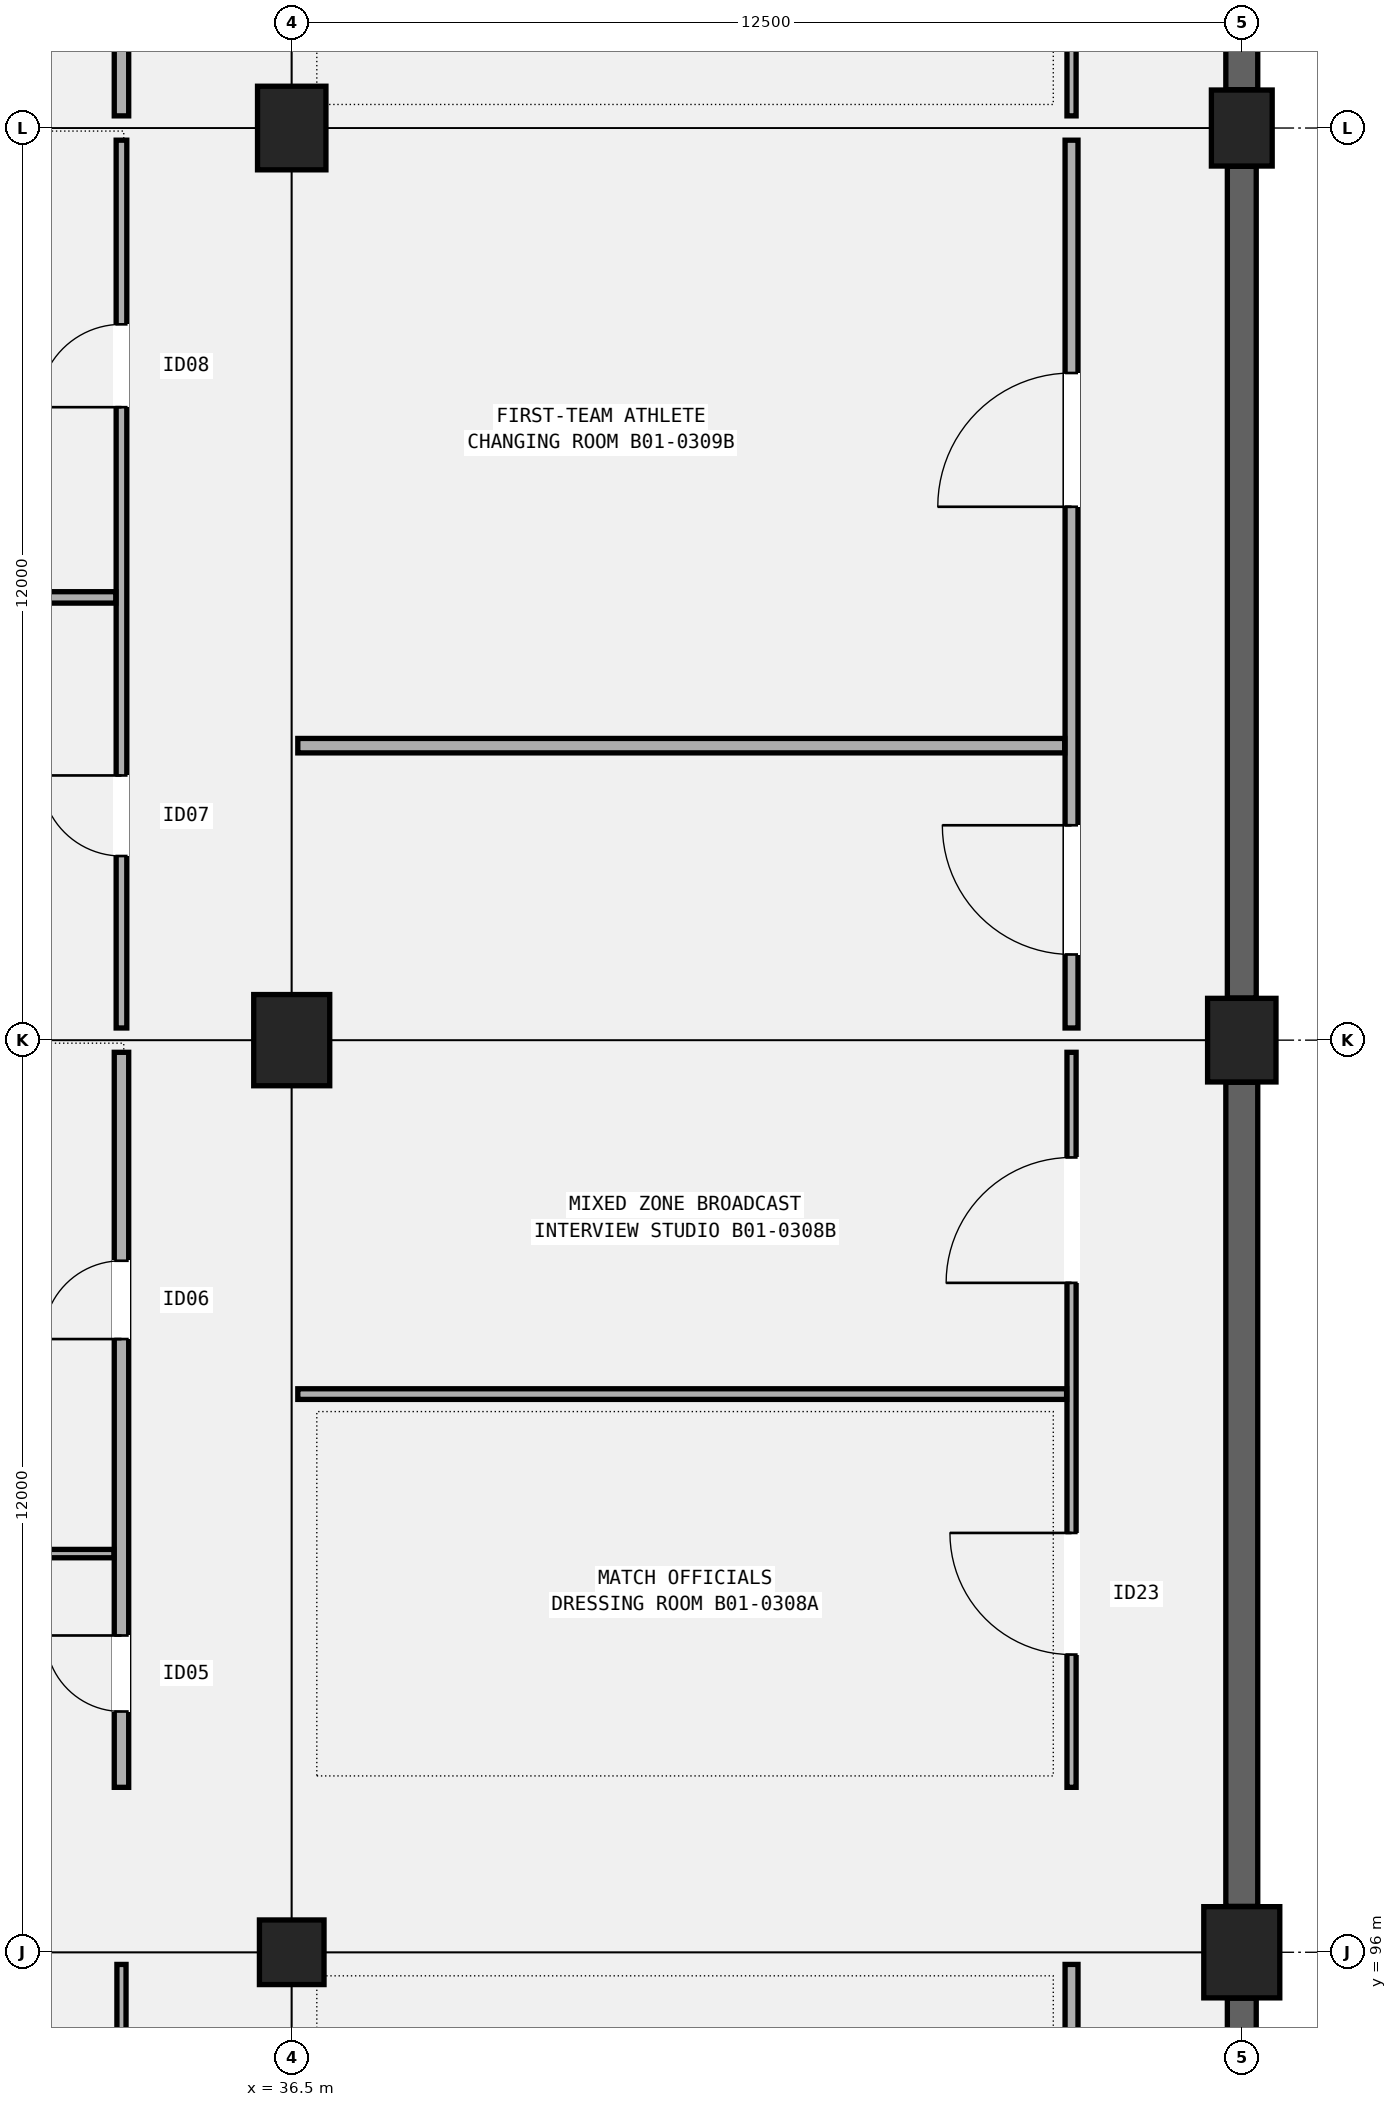
"""IFC4 building model, lengths in metres.
Left out: names, types, materials, properties, quantities, classifications, styles, units other than length and angle.
Written with IfcOpenShell. Run it as: python <this file> out.ifc"""

import sys

from ifc_helpers import new_model, si_unit, direction, frame, frame_2d, origin, origin_2d, place, context, subcontext, project, spatial, rectangle, circle, extrude, element, fill, save


model = new_model("IFC4")
c1 = context("Model", 3, precision=1e-05, world=origin(), true_north=direction((0.0, 1.0)))
c2 = subcontext(c1, "Body", "Model", "MODEL_VIEW")
j1 = project(units=[si_unit("LENGTHUNIT", "METRE"), si_unit("PLANEANGLEUNIT", "RADIAN")], contexts=[c1])
p1 = place(None, origin())
s1 = spatial("IfcSite", under=j1, at=p1, CompositionType="ELEMENT")
p2 = place(p1, origin())
s2 = spatial("IfcBuilding", under=s1, at=p2, CompositionType="ELEMENT")
p3 = place(p2, frame((0.0, 0.0, -4.8)))
s3 = spatial("IfcBuildingStorey", under=s2, at=p3, CompositionType="ELEMENT", Elevation=-4.8)
p4 = place(p3, frame((36.5, 96.0, 0.0), z_axis=(0.0, 0.0, 1.0), x_axis=(1.0, 0.0, 0.0)))
e1 = element("IfcColumn", 1, at=p4, inside=s3, PredefinedType="COLUMN", context=c2, shape_type="SweptSolid", body=[
    extrude(circle(Radius=0.425, at=origin_2d()), origin(), (0.0, 0.0, 1.0), 4.8),
])
p5 = place(p3, frame((36.5, 108.0, 0.0), z_axis=(0.0, 0.0, 1.0), x_axis=(1.0, 0.0, 0.0)))
e2 = element("IfcColumn", 2, at=p5, inside=s3, PredefinedType="COLUMN", context=c2, shape_type="SweptSolid", body=[
    extrude(rectangle(XDim=1.0, YDim=1.2, at=origin_2d()), origin(), (0.0, 0.0, 1.0), 4.8),
])
p6 = place(p3, frame((36.5, 120.0, 0.0), z_axis=(0.0, 0.0, 1.0), x_axis=(1.0, 0.0, 0.0)))
e3 = element("IfcColumn", 3, at=p6, inside=s3, PredefinedType="COLUMN", context=c2, shape_type="SweptSolid", body=[
    extrude(rectangle(XDim=0.9, YDim=1.1, at=origin_2d()), origin(), (0.0, 0.0, 1.0), 4.8),
])
p7 = place(p3, frame((49.0, 96.0, 0.0), z_axis=(0.0, 0.0, 1.0), x_axis=(1.0, 0.0, 0.0)))
e4 = element("IfcColumn", 4, at=p7, inside=s3, PredefinedType="COLUMN", context=c2, shape_type="SweptSolid", body=[
    extrude(rectangle(XDim=1.0, YDim=1.2, at=origin_2d()), origin(), (0.0, 0.0, 1.0), 4.8),
])
p8 = place(p3, frame((49.0, 108.0, 0.0), z_axis=(0.0, 0.0, 1.0), x_axis=(1.0, 0.0, 0.0)))
e5 = element("IfcColumn", 5, at=p8, inside=s3, PredefinedType="COLUMN", context=c2, shape_type="SweptSolid", body=[
    extrude(rectangle(XDim=0.9, YDim=1.1, at=origin_2d()), origin(), (0.0, 0.0, 1.0), 4.8),
])
p9 = place(p3, frame((49.0, 120.0, 0.0), z_axis=(0.0, 0.0, 1.0), x_axis=(1.0, 0.0, 0.0)))
e6 = element("IfcColumn", 6, at=p9, inside=s3, PredefinedType="COLUMN", context=c2, shape_type="SweptSolid", body=[
    extrude(rectangle(XDim=0.8, YDim=1.0, at=origin_2d()), origin(), (0.0, 0.0, 1.0), 4.8),
])
p10 = place(p3, frame((49.0, 84.429, 0.0), z_axis=(0.0, 0.0, 1.0), x_axis=(0.0, 1.0, 0.0)))
e7 = element("IfcWall", 7, at=p10, inside=s3, PredefinedType="STANDARD", context=c2, shape_type="SweptSolid", body=[
    extrude(rectangle(XDim=10.967, YDim=0.38, at=frame_2d((5.483, 0.0))), origin(), (0.0, 0.0, 1.0), 4.46),
])
p11 = place(p3, frame((49.0, 96.604, 0.0), z_axis=(0.0, 0.0, 1.0), x_axis=(0.0, 1.0, 0.0)))
e8 = element("IfcWall", 8, at=p11, inside=s3, PredefinedType="STANDARD", context=c2, shape_type="SweptSolid", body=[
    extrude(rectangle(XDim=10.842, YDim=0.42, at=frame_2d((5.421, 0.0))), origin(), (0.0, 0.0, 1.0), 4.46),
])
p12 = place(p3, frame((49.0, 108.554, 0.0), z_axis=(0.0, 0.0, 1.0), x_axis=(0.0, 1.0, 0.0)))
e9 = element("IfcWall", 9, at=p12, inside=s3, PredefinedType="STANDARD", context=c2, shape_type="SweptSolid", body=[
    extrude(rectangle(XDim=10.942, YDim=0.38, at=frame_2d((5.471, 0.0))), origin(), (0.0, 0.0, 1.0), 4.46),
])
p13 = place(p3, frame((49.0, 120.504, 0.0), z_axis=(0.0, 0.0, 1.0), x_axis=(0.0, 1.0, 0.0)))
e10 = element("IfcWall", 10, at=p13, inside=s3, PredefinedType="STANDARD", context=c2, shape_type="SweptSolid", body=[
    extrude(rectangle(XDim=11.067, YDim=0.42, at=frame_2d((5.534, 0.0))), origin(), (0.0, 0.0, 1.0), 4.46),
])
p14 = place(p3, frame((34.26, 84.16, 0.0), z_axis=(0.0, 0.0, 1.0), x_axis=(0.0, 1.0, 0.0)))
e11 = element("IfcWall", 11, at=p14, inside=s3, PredefinedType="PARTITIONING", context=c2, shape_type="SweptSolid", body=[
    extrude(rectangle(XDim=11.68, YDim=0.12, at=frame_2d((5.84, 0.0))), origin(), (0.0, 0.0, 1.0), 3.92),
])
p15 = place(p14, frame((2.609, 0.0, 0.0)))
e12 = element("IfcOpeningElement", 12, at=p15, cuts=e11, PredefinedType="OPENING", context=c2, shape_type="SweptSolid", body=[
    extrude(rectangle(XDim=0.95, YDim=2.12, at=frame_2d((0.475, 1.06))), frame((0.0, 0.07, 0.0), z_axis=(0.0, -1.0, 0.0), x_axis=(1.0, 0.0, 0.0)), (0.0, 0.0, 1.0), 0.14),
])
p16 = place(p14, frame((8.514, 0.0, 0.0)))
e13 = element("IfcOpeningElement", 13, at=p16, cuts=e11, PredefinedType="OPENING", context=c2, shape_type="SweptSolid", body=[
    extrude(rectangle(XDim=0.98, YDim=2.1, at=frame_2d((0.49, 1.05))), frame((0.0, 0.07, 0.0), z_axis=(0.0, -1.0, 0.0), x_axis=(1.0, 0.0, 0.0)), (0.0, 0.0, 1.0), 0.14),
])
p17 = place(p3, frame((34.26, 98.17, 0.0), z_axis=(0.0, 0.0, 1.0), x_axis=(0.0, 1.0, 0.0)))
e14 = element("IfcWall", 14, at=p17, inside=s3, PredefinedType="PARTITIONING", context=c2, shape_type="SweptSolid", body=[
    extrude(rectangle(XDim=9.67, YDim=0.19, at=frame_2d((4.835, 0.0))), origin(), (0.0, 0.0, 1.0), 3.92),
])
p18 = place(p17, frame((0.998, 0.0, 0.0)))
e15 = element("IfcOpeningElement", 15, at=p18, cuts=e14, PredefinedType="OPENING", context=c2, shape_type="SweptSolid", body=[
    extrude(rectangle(XDim=1.0, YDim=2.14, at=frame_2d((0.5, 1.07))), frame((0.0, 0.105, 0.0), z_axis=(0.0, -1.0, 0.0), x_axis=(1.0, 0.0, 0.0)), (0.0, 0.0, 1.0), 0.21),
])
p19 = place(p17, frame((5.897, 0.0, 0.0)))
e16 = element("IfcOpeningElement", 16, at=p19, cuts=e14, PredefinedType="OPENING", context=c2, shape_type="SweptSolid", body=[
    extrude(rectangle(XDim=1.03, YDim=2.12, at=frame_2d((0.515, 1.06))), frame((0.0, 0.105, 0.0), z_axis=(0.0, -1.0, 0.0), x_axis=(1.0, 0.0, 0.0)), (0.0, 0.0, 1.0), 0.21),
])
p20 = place(p3, frame((24.08, 101.245, 0.0), z_axis=(0.0, 0.0, 1.0), x_axis=(1.0, 0.0, 0.0)))
e17 = element("IfcWall", 17, at=p20, inside=s3, PredefinedType="PARTITIONING", context=c2, shape_type="SweptSolid", body=[
    extrude(rectangle(XDim=10.08, YDim=0.11, at=frame_2d((5.04, 0.0))), origin(), (0.0, 0.0, 1.0), 3.92),
])
p21 = place(p3, frame((34.26, 108.16, 0.0), z_axis=(0.0, 0.0, 1.0), x_axis=(0.0, 1.0, 0.0)))
e18 = element("IfcWall", 18, at=p21, inside=s3, PredefinedType="PARTITIONING", context=c2, shape_type="SweptSolid", body=[
    extrude(rectangle(XDim=11.68, YDim=0.14, at=frame_2d((5.84, 0.0))), origin(), (0.0, 0.0, 1.0), 3.92),
])
p22 = place(p21, frame((2.262, 0.0, 0.0)))
e19 = element("IfcOpeningElement", 19, at=p22, cuts=e18, PredefinedType="OPENING", context=c2, shape_type="SweptSolid", body=[
    extrude(rectangle(XDim=1.06, YDim=2.15, at=frame_2d((0.53, 1.075))), frame((0.0, 0.08, 0.0), z_axis=(0.0, -1.0, 0.0), x_axis=(1.0, 0.0, 0.0)), (0.0, 0.0, 1.0), 0.16),
])
p23 = place(p21, frame((8.167, 0.0, 0.0)))
e20 = element("IfcOpeningElement", 20, at=p23, cuts=e18, PredefinedType="OPENING", context=c2, shape_type="SweptSolid", body=[
    extrude(rectangle(XDim=1.09, YDim=2.16, at=frame_2d((0.545, 1.08))), frame((0.0, 0.08, 0.0), z_axis=(0.0, -1.0, 0.0), x_axis=(1.0, 0.0, 0.0)), (0.0, 0.0, 1.0), 0.16),
])
p24 = place(p3, frame((24.08, 113.825, 0.0), z_axis=(0.0, 0.0, 1.0), x_axis=(1.0, 0.0, 0.0)))
e21 = element("IfcWall", 21, at=p24, inside=s3, PredefinedType="PARTITIONING", context=c2, shape_type="SweptSolid", body=[
    extrude(rectangle(XDim=10.105, YDim=0.15, at=frame_2d((5.052, 0.0))), origin(), (0.0, 0.0, 1.0), 3.92),
])
p25 = place(p3, frame((34.26, 120.16, 0.0), z_axis=(0.0, 0.0, 1.0), x_axis=(0.0, 1.0, 0.0)))
e22 = element("IfcWall", 22, at=p25, inside=s3, PredefinedType="PARTITIONING", context=c2, shape_type="SweptSolid", body=[
    extrude(rectangle(XDim=11.68, YDim=0.19, at=frame_2d((5.84, 0.0))), origin(), (0.0, 0.0, 1.0), 3.92),
])
p26 = place(p25, frame((5.28, 0.0, 0.0)))
e23 = element("IfcOpeningElement", 23, at=p26, cuts=e22, PredefinedType="OPENING", context=c2, shape_type="SweptSolid", body=[
    extrude(rectangle(XDim=1.12, YDim=2.18, at=frame_2d((0.56, 1.09))), frame((0.0, 0.105, 0.0), z_axis=(0.0, -1.0, 0.0), x_axis=(1.0, 0.0, 0.0)), (0.0, 0.0, 1.0), 0.21),
])
p27 = place(p3, frame((46.76, 84.16, 0.0), z_axis=(0.0, 0.0, 1.0), x_axis=(0.0, 1.0, 0.0)))
e24 = element("IfcWall", 24, at=p27, inside=s3, PredefinedType="PARTITIONING", context=c2, shape_type="SweptSolid", body=[
    extrude(rectangle(XDim=11.68, YDim=0.17, at=frame_2d((5.84, 0.0))), origin(), (0.0, 0.0, 1.0), 3.92),
])
p28 = place(p27, frame((5.06, 0.0, 0.0)))
e25 = element("IfcOpeningElement", 25, at=p28, cuts=e24, PredefinedType="OPENING", context=c2, shape_type="SweptSolid", body=[
    extrude(rectangle(XDim=1.56, YDim=2.26, at=frame_2d((0.78, 1.13))), frame((0.0, 0.095, 0.0), z_axis=(0.0, -1.0, 0.0), x_axis=(1.0, 0.0, 0.0)), (0.0, 0.0, 1.0), 0.19),
])
p29 = place(p3, frame((46.76, 98.17, 0.0), z_axis=(0.0, 0.0, 1.0), x_axis=(0.0, 1.0, 0.0)))
e26 = element("IfcWall", 26, at=p29, inside=s3, PredefinedType="PARTITIONING", context=c2, shape_type="SweptSolid", body=[
    extrude(rectangle(XDim=9.67, YDim=0.12, at=frame_2d((4.835, 0.0))), origin(), (0.0, 0.0, 1.0), 3.92),
])
p30 = place(p29, frame((1.747, 0.0, 0.0)))
e27 = element("IfcOpeningElement", 27, at=p30, cuts=e26, PredefinedType="OPENING", context=c2, shape_type="SweptSolid", body=[
    extrude(rectangle(XDim=1.6, YDim=2.3, at=frame_2d((0.8, 1.15))), frame((0.0, 0.07, 0.0), z_axis=(0.0, -1.0, 0.0), x_axis=(1.0, 0.0, 0.0)), (0.0, 0.0, 1.0), 0.14),
])
p31 = place(p29, frame((6.637, 0.0, 0.0)))
e28 = element("IfcOpeningElement", 28, at=p31, cuts=e26, PredefinedType="OPENING", context=c2, shape_type="SweptSolid", body=[
    extrude(rectangle(XDim=1.65, YDim=2.28, at=frame_2d((0.825, 1.14))), frame((0.0, 0.07, 0.0), z_axis=(0.0, -1.0, 0.0), x_axis=(1.0, 0.0, 0.0)), (0.0, 0.0, 1.0), 0.14),
])
p32 = place(p3, frame((36.58, 103.344, 0.0), z_axis=(0.0, 0.0, 1.0), x_axis=(1.0, 0.0, 0.0)))
e29 = element("IfcWall", 29, at=p32, inside=s3, PredefinedType="PARTITIONING", context=c2, shape_type="SweptSolid", body=[
    extrude(rectangle(XDim=10.115, YDim=0.14, at=frame_2d((5.058, 0.0))), origin(), (0.0, 0.0, 1.0), 3.92),
])
p33 = place(p3, frame((46.76, 108.16, 0.0), z_axis=(0.0, 0.0, 1.0), x_axis=(0.0, 1.0, 0.0)))
e30 = element("IfcWall", 30, at=p33, inside=s3, PredefinedType="PARTITIONING", context=c2, shape_type="SweptSolid", body=[
    extrude(rectangle(XDim=11.68, YDim=0.17, at=frame_2d((5.84, 0.0))), origin(), (0.0, 0.0, 1.0), 3.92),
])
p34 = place(p33, frame((0.967, 0.0, 0.0)))
e31 = element("IfcOpeningElement", 31, at=p34, cuts=e30, PredefinedType="OPENING", context=c2, shape_type="SweptSolid", body=[
    extrude(rectangle(XDim=1.7, YDim=2.32, at=frame_2d((0.85, 1.16))), frame((0.0, 0.095, 0.0), z_axis=(0.0, -1.0, 0.0), x_axis=(1.0, 0.0, 0.0)), (0.0, 0.0, 1.0), 0.19),
])
p35 = place(p33, frame((6.857, 0.0, 0.0)))
e32 = element("IfcOpeningElement", 32, at=p35, cuts=e30, PredefinedType="OPENING", context=c2, shape_type="SweptSolid", body=[
    extrude(rectangle(XDim=1.76, YDim=2.3, at=frame_2d((0.88, 1.15))), frame((0.0, 0.095, 0.0), z_axis=(0.0, -1.0, 0.0), x_axis=(1.0, 0.0, 0.0)), (0.0, 0.0, 1.0), 0.19),
])
p36 = place(p3, frame((36.58, 111.874, 0.0), z_axis=(0.0, 0.0, 1.0), x_axis=(1.0, 0.0, 0.0)))
e33 = element("IfcWall", 33, at=p36, inside=s3, PredefinedType="PARTITIONING", context=c2, shape_type="SweptSolid", body=[
    extrude(rectangle(XDim=10.09, YDim=0.19, at=frame_2d((5.045, 0.0))), origin(), (0.0, 0.0, 1.0), 3.92),
])
p37 = place(p3, frame((46.76, 120.16, 0.0), z_axis=(0.0, 0.0, 1.0), x_axis=(0.0, 1.0, 0.0)))
e34 = element("IfcWall", 34, at=p37, inside=s3, PredefinedType="PARTITIONING", context=c2, shape_type="SweptSolid", body=[
    extrude(rectangle(XDim=11.68, YDim=0.12, at=frame_2d((5.84, 0.0))), origin(), (0.0, 0.0, 1.0), 3.92),
])
p38 = place(p37, frame((2.342, 0.0, 0.0)))
e35 = element("IfcOpeningElement", 35, at=p38, cuts=e34, PredefinedType="OPENING", context=c2, shape_type="SweptSolid", body=[
    extrude(rectangle(XDim=0.9, YDim=2.06, at=frame_2d((0.45, 1.03))), frame((0.0, 0.07, 0.0), z_axis=(0.0, -1.0, 0.0), x_axis=(1.0, 0.0, 0.0)), (0.0, 0.0, 1.0), 0.14),
])
p39 = place(p37, frame((8.252, 0.0, 0.0)))
e36 = element("IfcOpeningElement", 36, at=p39, cuts=e34, PredefinedType="OPENING", context=c2, shape_type="SweptSolid", body=[
    extrude(rectangle(XDim=0.92, YDim=2.1, at=frame_2d((0.46, 1.05))), frame((0.0, 0.07, 0.0), z_axis=(0.0, -1.0, 0.0), x_axis=(1.0, 0.0, 0.0)), (0.0, 0.0, 1.0), 0.14),
])
p40 = place(p18, origin())
e37 = element("IfcDoor", 37, at=p40, inside=s3, OperationType="SINGLE_SWING_RIGHT", PredefinedType="DOOR", context=c2, shape_type="SweptSolid", body=[
    extrude(rectangle(XDim=1.0, YDim=2.14, at=frame_2d((0.5, 1.07))), frame((0.0, 0.025, 0.0), z_axis=(0.0, -1.0, 0.0), x_axis=(1.0, 0.0, 0.0)), (0.0, 0.0, 1.0), 0.05),
])
fill(e15, e37)
p41 = place(p19, origin())
e38 = element("IfcDoor", 38, at=p41, inside=s3, OperationType="SINGLE_SWING_LEFT", PredefinedType="DOOR", context=c2, shape_type="SweptSolid", body=[
    extrude(rectangle(XDim=1.03, YDim=2.12, at=frame_2d((0.515, 1.06))), frame((0.0, 0.025, 0.0), z_axis=(0.0, -1.0, 0.0), x_axis=(1.0, 0.0, 0.0)), (0.0, 0.0, 1.0), 0.05),
])
fill(e16, e38)
p42 = place(p22, origin())
e39 = element("IfcDoor", 39, at=p42, inside=s3, OperationType="SINGLE_SWING_RIGHT", PredefinedType="DOOR", context=c2, shape_type="SweptSolid", body=[
    extrude(rectangle(XDim=1.06, YDim=2.15, at=frame_2d((0.53, 1.075))), frame((0.0, 0.025, 0.0), z_axis=(0.0, -1.0, 0.0), x_axis=(1.0, 0.0, 0.0)), (0.0, 0.0, 1.0), 0.05),
])
fill(e19, e39)
p43 = place(p23, origin())
e40 = element("IfcDoor", 40, at=p43, inside=s3, OperationType="SINGLE_SWING_LEFT", PredefinedType="DOOR", context=c2, shape_type="SweptSolid", body=[
    extrude(rectangle(XDim=1.09, YDim=2.16, at=frame_2d((0.545, 1.08))), frame((0.0, 0.025, 0.0), z_axis=(0.0, -1.0, 0.0), x_axis=(1.0, 0.0, 0.0)), (0.0, 0.0, 1.0), 0.05),
])
fill(e20, e40)
p44 = place(p30, origin())
e41 = element("IfcDoor", 41, at=p44, inside=s3, OperationType="SINGLE_SWING_RIGHT", PredefinedType="DOOR", context=c2, shape_type="SweptSolid", body=[
    extrude(rectangle(XDim=1.6, YDim=2.3, at=frame_2d((0.8, 1.15))), frame((0.0, 0.025, 0.0), z_axis=(0.0, -1.0, 0.0), x_axis=(1.0, 0.0, 0.0)), (0.0, 0.0, 1.0), 0.05),
])
fill(e27, e41)
p45 = place(p31, origin())
e42 = element("IfcDoor", 42, at=p45, inside=s3, OperationType="SINGLE_SWING_LEFT", PredefinedType="DOOR", context=c2, shape_type="SweptSolid", body=[
    extrude(rectangle(XDim=1.65, YDim=2.28, at=frame_2d((0.825, 1.14))), frame((0.0, 0.025, 0.0), z_axis=(0.0, -1.0, 0.0), x_axis=(1.0, 0.0, 0.0)), (0.0, 0.0, 1.0), 0.05),
])
fill(e28, e42)
p46 = place(p34, origin())
e43 = element("IfcDoor", 43, at=p46, inside=s3, OperationType="SINGLE_SWING_RIGHT", PredefinedType="DOOR", context=c2, shape_type="SweptSolid", body=[
    extrude(rectangle(XDim=1.7, YDim=2.32, at=frame_2d((0.85, 1.16))), frame((0.0, 0.025, 0.0), z_axis=(0.0, -1.0, 0.0), x_axis=(1.0, 0.0, 0.0)), (0.0, 0.0, 1.0), 0.05),
])
fill(e31, e43)
p47 = place(p35, origin())
e44 = element("IfcDoor", 44, at=p47, inside=s3, OperationType="SINGLE_SWING_LEFT", PredefinedType="DOOR", context=c2, shape_type="SweptSolid", body=[
    extrude(rectangle(XDim=1.76, YDim=2.3, at=frame_2d((0.88, 1.15))), frame((0.0, 0.025, 0.0), z_axis=(0.0, -1.0, 0.0), x_axis=(1.0, 0.0, 0.0)), (0.0, 0.0, 1.0), 0.05),
])
fill(e32, e44)
save(model, sys.argv[1])
